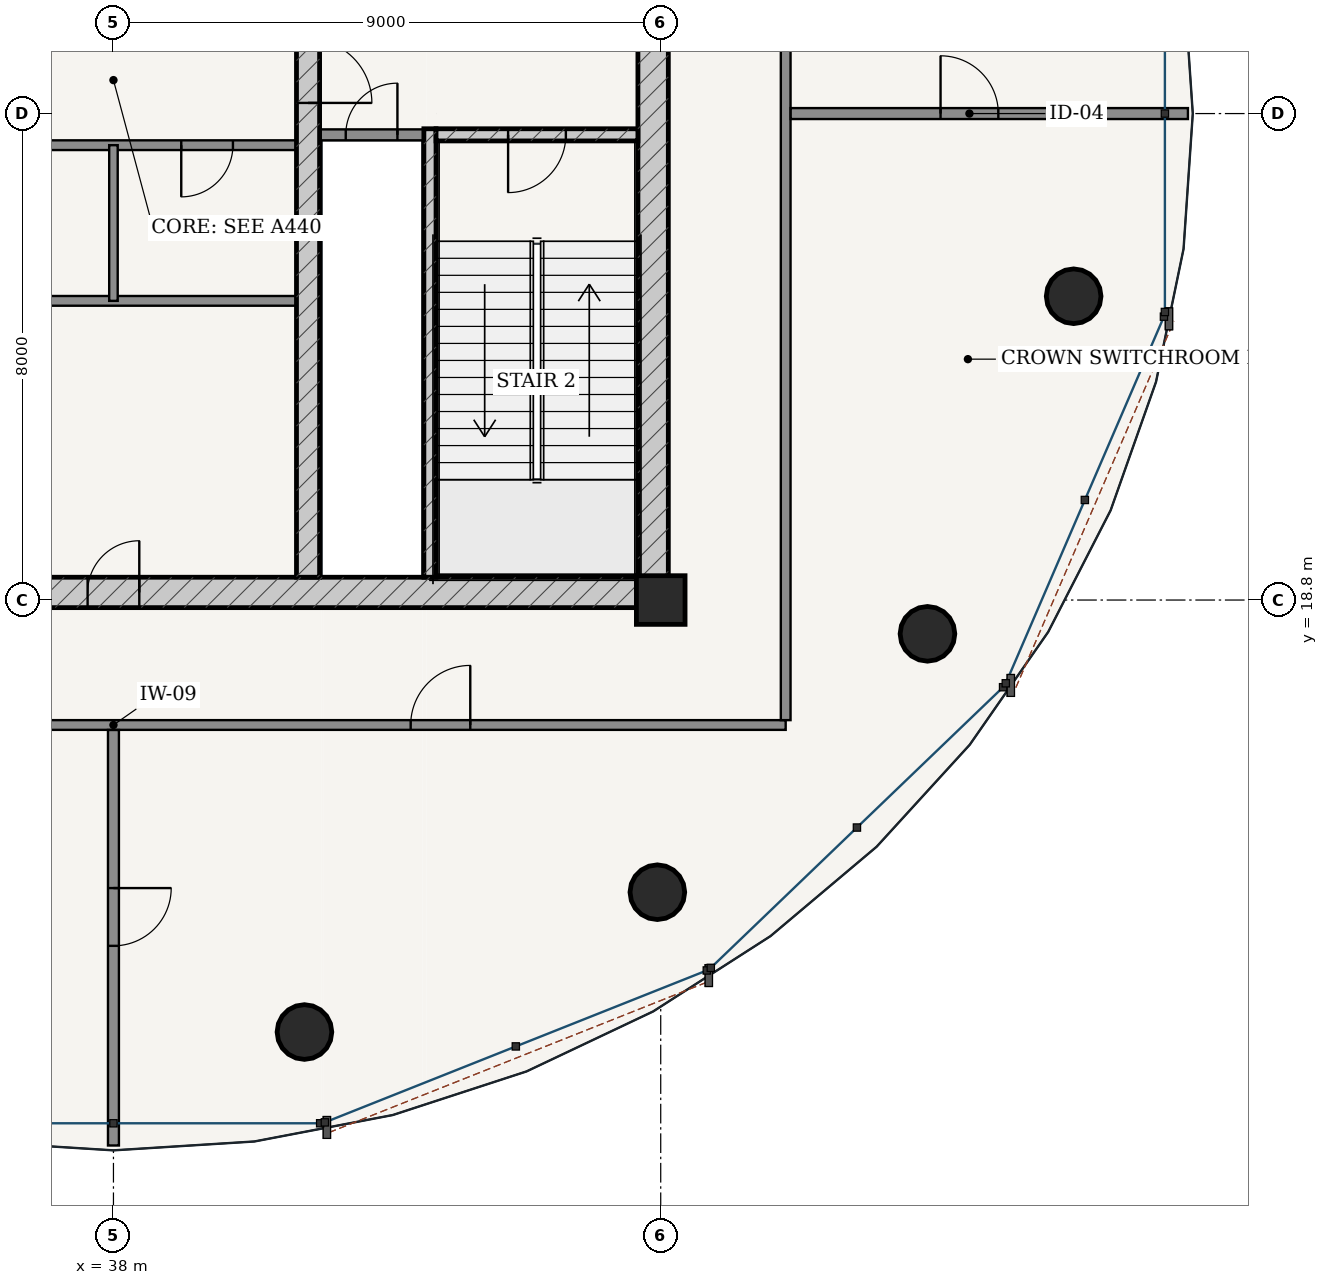
"""IFC4 building model, lengths in metres.
Left out: names, types, materials, properties, quantities, classifications, styles, units other than length and angle.
Written with IfcOpenShell. Run it as: python <this file> out.ifc"""

import sys

from ifc_helpers import new_model, si_unit, direction, frame, frame_2d, origin, origin_2d, place, context, subcontext, project, spatial, rectangle, hollow_circle, extrude, source, transform, mapped, element, fill, save


model = new_model("IFC4")
c1 = context("Model", 3, precision=1e-05, world=origin(), true_north=direction((-0.2419218956, 0.970295726276)))
c2 = subcontext(c1, "Body", "Model", "MODEL_VIEW")
j1 = project(units=[si_unit("LENGTHUNIT", "METRE"), si_unit("PLANEANGLEUNIT", "RADIAN")], contexts=[c1])
p1 = place(None, origin())
s1 = spatial("IfcSite", under=j1, at=p1, CompositionType="ELEMENT")
p2 = place(p1, origin())
s2 = spatial("IfcBuilding", under=s1, at=p2, CompositionType="ELEMENT")
p3 = place(p2, frame((0.0, 0.0, 316.5)))
s3 = spatial("IfcBuildingStorey", under=s2, at=p3, CompositionType="ELEMENT", Elevation=316.5)
p4 = place(p3, frame((47.0, 18.8, 0.0), z_axis=(0.0, 0.0, 1.0), x_axis=(1.0, 0.0, 0.0)))
e1 = element("IfcColumn", 1, at=p4, inside=s3, PredefinedType="COLUMN", context=c2, shape_type="SweptSolid", body=[
    extrude(rectangle(XDim=0.8, YDim=0.8, at=origin_2d()), origin(), (0.0, 0.0, 1.0), 5.2),
])
p5 = place(p3, frame((28.875, 18.925, 0.0), z_axis=(0.0, 0.0, 1.0), x_axis=(1.0, 0.0, 0.0)))
e2 = element("IfcWall", 2, at=p5, inside=s3, PredefinedType="SHEAR", context=c2, shape_type="SweptSolid", body=[
    extrude(rectangle(XDim=18.25, YDim=0.5, at=frame_2d((9.125, 0.0))), origin(), (0.0, 0.0, 1.0), 4.78),
])
p6 = place(p5, frame((8.7, 0.0, 0.0)))
e3 = element("IfcOpeningElement", 3, at=p6, cuts=e2, PredefinedType="OPENING", context=c2, shape_type="SweptSolid", body=[
    extrude(rectangle(XDim=0.85, YDim=2.1, at=frame_2d((0.425, 1.05))), frame((0.0, 0.26, 0.0), z_axis=(0.0, -1.0, 0.0), x_axis=(1.0, 0.0, 0.0)), (0.0, 0.0, 1.0), 0.52),
])
p7 = place(p3, frame((46.875, 19.175, 0.0), z_axis=(0.0, 0.0, 1.0), x_axis=(0.0, 1.0, 0.0)))
e4 = element("IfcWall", 4, at=p7, inside=s3, PredefinedType="SHEAR", context=c2, shape_type="SweptSolid", body=[
    extrude(rectangle(XDim=15.25, YDim=0.5, at=frame_2d((7.625, 0.0))), origin(), (0.0, 0.0, 1.0), 4.78),
])
p8 = place(p7, frame((9.875, 0.0, 0.0)))
e5 = element("IfcOpeningElement", 5, at=p8, cuts=e4, PredefinedType="OPENING", context=c2, shape_type="SweptSolid", body=[
    extrude(rectangle(XDim=1.5, YDim=2.2, at=frame_2d((0.75, 1.1))), frame((0.0, 0.26, 0.0), z_axis=(0.0, -1.0, 0.0), x_axis=(1.0, 0.0, 0.0)), (0.0, 0.0, 1.0), 0.52),
])
p9 = place(p3, frame((43.205, 19.175, 0.0), z_axis=(0.0, 0.0, 1.0), x_axis=(0.0, 1.0, 0.0)))
e6 = element("IfcWall", 6, at=p9, inside=s3, PredefinedType="SOLIDWALL", context=c2, shape_type="SweptSolid", body=[
    extrude(rectangle(XDim=7.375, YDim=0.2, at=frame_2d((3.688, 0.0))), origin(), (0.0, 0.0, 1.0), 4.78),
])
p10 = place(p3, frame((43.305, 26.45, 0.0), z_axis=(0.0, 0.0, 1.0), x_axis=(1.0, 0.0, 0.0)))
e7 = element("IfcWall", 7, at=p10, inside=s3, PredefinedType="SOLIDWALL", context=c2, shape_type="SweptSolid", body=[
    extrude(rectangle(XDim=3.32, YDim=0.2, at=frame_2d((1.66, 0.0))), origin(), (0.0, 0.0, 1.0), 4.78),
])
p11 = place(p10, frame((1.185, 0.0, 0.0)))
e8 = element("IfcOpeningElement", 8, at=p11, cuts=e7, PredefinedType="OPENING", context=c2, shape_type="SweptSolid", body=[
    extrude(rectangle(XDim=0.95, YDim=2.15, at=frame_2d((0.475, 1.075))), frame((0.0, 0.11, 0.0), z_axis=(0.0, -1.0, 0.0), x_axis=(1.0, 0.0, 0.0)), (0.0, 0.0, 1.0), 0.22),
])
p12 = place(p3, frame((41.2, 19.175, 0.0), z_axis=(0.0, 0.0, 1.0), x_axis=(0.0, 1.0, 0.0)))
e9 = element("IfcWall", 9, at=p12, inside=s3, PredefinedType="SHEAR", context=c2, shape_type="SweptSolid", body=[
    extrude(rectangle(XDim=15.25, YDim=0.38, at=frame_2d((7.625, 0.0))), origin(), (0.0, 0.0, 1.0), 4.78),
])
p13 = place(p12, frame((7.8, 0.0, 0.0)))
e10 = element("IfcOpeningElement", 10, at=p13, cuts=e9, PredefinedType="OPENING", context=c2, shape_type="SweptSolid", body=[
    extrude(rectangle(XDim=1.05, YDim=2.15, at=frame_2d((0.525, 1.075))), frame((0.0, 0.2, 0.0), z_axis=(0.0, -1.0, 0.0), x_axis=(1.0, 0.0, 0.0)), (0.0, 0.0, 1.0), 0.4),
])
for number, where, z_axis, x_axis in (
    (11, (41.141, 11.696, 0.0), (0.0, 0.0, 1.0), (1.0, 0.0, 0.0)),
    (12, (46.945, 13.995, 0.0), (0.0, 0.0, 1.0), (1.0, 0.0, 0.0)),
    (13, (51.387, 18.244, 0.0), (0.0, 0.0, 1.0), (1.0, 0.0, 0.0)),
    (14, (53.791, 23.796, 0.0), (0.0, 0.0, 1.0), (1.0, 0.0, 0.0)),
):
    element("IfcColumn", number, at=place(p3, frame(where, z_axis=z_axis, x_axis=x_axis)), inside=s3, PredefinedType="COLUMN", context=c2, shape_type="SweptSolid", body=[
        extrude(hollow_circle(Radius=0.45, WallThickness=0.032, at=origin_2d()), origin(), (0.0, 0.0, 1.0), 5.2),
    ])
p14 = place(p3, frame((41.39, 26.45, 0.0), z_axis=(0.0, 0.0, 1.0), x_axis=(1.0, 0.0, 0.0)))
e15 = element("IfcWall", 15, at=p14, inside=s3, PredefinedType="PARTITIONING", context=c2, shape_type="SweptSolid", body=[
    extrude(rectangle(XDim=1.71, YDim=0.18, at=frame_2d((0.855, 0.0))), origin(), (0.0, 0.0, 1.0), 4.78),
])
p15 = place(p14, frame((0.43, 0.0, 0.0)))
e16 = element("IfcOpeningElement", 16, at=p15, cuts=e15, PredefinedType="OPENING", context=c2, shape_type="SweptSolid", body=[
    extrude(rectangle(XDim=0.85, YDim=2.1, at=frame_2d((0.425, 1.05))), frame((0.0, 0.1, 0.0), z_axis=(0.0, -1.0, 0.0), x_axis=(1.0, 0.0, 0.0)), (0.0, 0.0, 1.0), 0.2),
])
p16 = place(p3, frame((34.99, 26.28, 0.0), z_axis=(0.0, 0.0, 1.0), x_axis=(1.0, 0.0, 0.0)))
e17 = element("IfcWall", 17, at=p16, inside=s3, PredefinedType="PARTITIONING", context=c2, shape_type="SweptSolid", body=[
    extrude(rectangle(XDim=6.02, YDim=0.16, at=frame_2d((3.01, 0.0))), origin(), (0.0, 0.0, 1.0), 4.78),
])
p17 = place(p16, frame((1.045, 0.0, 0.0)))
e18 = element("IfcOpeningElement", 18, at=p17, cuts=e17, PredefinedType="OPENING", context=c2, shape_type="SweptSolid", body=[
    extrude(rectangle(XDim=0.85, YDim=2.1, at=frame_2d((0.425, 1.05))), frame((0.0, 0.09, 0.0), z_axis=(0.0, -1.0, 0.0), x_axis=(1.0, 0.0, 0.0)), (0.0, 0.0, 1.0), 0.18),
])
p18 = place(p16, frame((4.125, 0.0, 0.0)))
e19 = element("IfcOpeningElement", 19, at=p18, cuts=e17, PredefinedType="OPENING", context=c2, shape_type="SweptSolid", body=[
    extrude(rectangle(XDim=0.85, YDim=2.1, at=frame_2d((0.425, 1.05))), frame((0.0, 0.09, 0.0), z_axis=(0.0, -1.0, 0.0), x_axis=(1.0, 0.0, 0.0)), (0.0, 0.0, 1.0), 0.18),
])
p19 = place(p3, frame((34.99, 23.72, 0.0), z_axis=(0.0, 0.0, 1.0), x_axis=(1.0, 0.0, 0.0)))
e20 = element("IfcWall", 20, at=p19, inside=s3, PredefinedType="PARTITIONING", context=c2, shape_type="SweptSolid", body=[
    extrude(rectangle(XDim=6.02, YDim=0.16, at=frame_2d((3.01, 0.0))), origin(), (0.0, 0.0, 1.0), 4.78),
])
p20 = place(p3, frame((38.0, 23.72, 0.0), z_axis=(0.0, 0.0, 1.0), x_axis=(0.0, 1.0, 0.0)))
e21 = element("IfcWall", 21, at=p20, inside=s3, PredefinedType="PARTITIONING", context=c2, shape_type="SweptSolid", body=[
    extrude(rectangle(XDim=2.56, YDim=0.14, at=frame_2d((1.28, 0.0))), origin(), (0.0, 0.0, 1.0), 4.78),
])
p21 = place(p3, frame((26.945, 16.745, 0.0), z_axis=(0.0, 0.0, 1.0), x_axis=(1.0, 0.0, 0.0)))
e22 = element("IfcWall", 22, at=p21, inside=s3, PredefinedType="PARTITIONING", context=c2, shape_type="SweptSolid", body=[
    extrude(rectangle(XDim=22.11, YDim=0.16, at=frame_2d((11.055, 0.0))), origin(), (0.0, 0.0, 1.0), 4.352),
])
p22 = place(p21, frame((5.187, 0.0, 0.0)))
e23 = element("IfcOpeningElement", 23, at=p22, cuts=e22, PredefinedType="OPENING", context=c2, shape_type="SweptSolid", body=[
    extrude(rectangle(XDim=0.98, YDim=2.2, at=frame_2d((0.49, 1.1))), frame((0.0, 0.09, 0.0), z_axis=(0.0, -1.0, 0.0), x_axis=(1.0, 0.0, 0.0)), (0.0, 0.0, 1.0), 0.18),
])
p23 = place(p21, frame((15.943, 0.0, 0.0)))
e24 = element("IfcOpeningElement", 24, at=p23, cuts=e22, PredefinedType="OPENING", context=c2, shape_type="SweptSolid", body=[
    extrude(rectangle(XDim=0.98, YDim=2.2, at=frame_2d((0.49, 1.1))), frame((0.0, 0.09, 0.0), z_axis=(0.0, -1.0, 0.0), x_axis=(1.0, 0.0, 0.0)), (0.0, 0.0, 1.0), 0.18),
])
p24 = place(p3, frame((49.055, 16.825, 0.0), z_axis=(0.0, 0.0, 1.0), x_axis=(0.0, 1.0, 0.0)))
e25 = element("IfcWall", 25, at=p24, inside=s3, PredefinedType="PARTITIONING", context=c2, shape_type="SweptSolid", body=[
    extrude(rectangle(XDim=19.95, YDim=0.16, at=frame_2d((9.975, 0.0))), origin(), (0.0, 0.0, 1.0), 4.352),
])
p25 = place(p3, frame((49.137, 26.8, 0.0), z_axis=(0.0, 0.0, 1.0), x_axis=(1.0, 0.0, 0.0)))
e26 = element("IfcWall", 26, at=p25, inside=s3, PredefinedType="PARTITIONING", context=c2, shape_type="SweptSolid", body=[
    extrude(rectangle(XDim=6.533, YDim=0.18, at=frame_2d((3.267, 0.0))), origin(), (0.0, 0.0, 1.0), 4.411),
])
p26 = place(p25, frame((2.465, 0.0, 0.0)))
e27 = element("IfcOpeningElement", 27, at=p26, cuts=e26, PredefinedType="OPENING", context=c2, shape_type="SweptSolid", body=[
    extrude(rectangle(XDim=0.95, YDim=2.15, at=frame_2d((0.475, 1.075))), frame((0.0, 0.1, 0.0), z_axis=(0.0, -1.0, 0.0), x_axis=(1.0, 0.0, 0.0)), (0.0, 0.0, 1.0), 0.2),
])
p27 = place(p3, frame((38.0, 16.663, 0.0), z_axis=(0.0, 0.0, 1.0), x_axis=(0.0, -1.0, 0.0)))
e28 = element("IfcWall", 28, at=p27, inside=s3, PredefinedType="PARTITIONING", context=c2, shape_type="SweptSolid", body=[
    extrude(rectangle(XDim=6.833, YDim=0.18, at=frame_2d((3.417, 0.0))), origin(), (0.0, 0.0, 1.0), 4.411),
])
p28 = place(p27, frame((2.6, 0.0, 0.0)))
e29 = element("IfcOpeningElement", 29, at=p28, cuts=e28, PredefinedType="OPENING", context=c2, shape_type="SweptSolid", body=[
    extrude(rectangle(XDim=0.95, YDim=2.15, at=frame_2d((0.475, 1.075))), frame((0.0, 0.1, 0.0), z_axis=(0.0, -1.0, 0.0), x_axis=(1.0, 0.0, 0.0)), (0.0, 0.0, 1.0), 0.2),
])
m1 = source(origin(), c2, "Body", "SweptSolid", [
    extrude(rectangle(XDim=1.05, YDim=2.15, at=frame_2d((0.525, 1.075))), frame((0.0, 0.025, 0.0), z_axis=(0.0, -1.0, 0.0), x_axis=(1.0, 0.0, 0.0)), (0.0, 0.0, 1.0), 0.05),
])
p29 = place(p13, frame((1.05, 0.0, 0.0), z_axis=(0.0, 0.0, 1.0), x_axis=(-1.0, 0.0, 0.0)))
e30 = element("IfcDoor", 30, at=p29, inside=s3, OperationType="SINGLE_SWING_RIGHT", PredefinedType="DOOR", context=c2, shape_type="MappedRepresentation", body=[
    mapped(m1, transform((0.0, 0.0, 0.0), scale=1.0)),
])
fill(e10, e30)
m2 = source(origin(), c2, "Body", "SweptSolid", [
    extrude(rectangle(XDim=0.95, YDim=2.15, at=frame_2d((0.475, 1.075))), frame((0.0, 0.025, 0.0), z_axis=(0.0, -1.0, 0.0), x_axis=(1.0, 0.0, 0.0)), (0.0, 0.0, 1.0), 0.05),
])
p30 = place(p11, frame((0.95, 0.0, 0.0), z_axis=(0.0, 0.0, 1.0), x_axis=(-1.0, 0.0, 0.0)))
e31 = element("IfcDoor", 31, at=p30, inside=s3, OperationType="SINGLE_SWING_RIGHT", PredefinedType="DOOR", context=c2, shape_type="MappedRepresentation", body=[
    mapped(m2, transform((0.0, 0.0, 0.0), scale=1.0)),
])
fill(e8, e31)
m3 = source(origin(), c2, "Body", "SweptSolid", [
    extrude(rectangle(XDim=0.85, YDim=2.1, at=frame_2d((0.425, 1.05))), frame((0.0, 0.025, 0.0), z_axis=(0.0, -1.0, 0.0), x_axis=(1.0, 0.0, 0.0)), (0.0, 0.0, 1.0), 0.05),
])
p31 = place(p15, origin())
e32 = element("IfcDoor", 32, at=p31, inside=s3, OperationType="SINGLE_SWING_RIGHT", PredefinedType="DOOR", context=c2, shape_type="MappedRepresentation", body=[
    mapped(m3, transform((0.0, 0.0, 0.0), scale=1.0)),
])
fill(e16, e32)
p32 = place(p18, frame((0.85, 0.0, 0.0), z_axis=(0.0, 0.0, 1.0), x_axis=(-1.0, 0.0, 0.0)))
e33 = element("IfcDoor", 33, at=p32, inside=s3, OperationType="SINGLE_SWING_RIGHT", PredefinedType="DOOR", context=c2, shape_type="MappedRepresentation", body=[
    mapped(m3, transform((0.0, 0.0, 0.0), scale=1.0)),
])
fill(e19, e33)
p33 = place(p6, origin())
e34 = element("IfcDoor", 34, at=p33, inside=s3, OperationType="SINGLE_SWING_RIGHT", PredefinedType="DOOR", context=c2, shape_type="MappedRepresentation", body=[
    mapped(m3, transform((0.0, 0.0, 0.0), scale=1.0)),
])
fill(e3, e34)
m4 = source(origin(), c2, "Body", "SweptSolid", [
    extrude(rectangle(XDim=0.98, YDim=2.2, at=frame_2d((0.49, 1.1))), frame((0.0, 0.025, 0.0), z_axis=(0.0, -1.0, 0.0), x_axis=(1.0, 0.0, 0.0)), (0.0, 0.0, 1.0), 0.05),
])
p34 = place(p23, origin())
e35 = element("IfcDoor", 35, at=p34, inside=s3, OperationType="SINGLE_SWING_RIGHT", PredefinedType="DOOR", context=c2, shape_type="MappedRepresentation", body=[
    mapped(m4, transform((0.0, 0.0, 0.0), scale=1.0)),
])
fill(e24, e35)
p35 = place(p26, origin())
e36 = element("IfcDoor", 36, at=p35, inside=s3, OperationType="SINGLE_SWING_LEFT", PredefinedType="DOOR", context=c2, shape_type="MappedRepresentation", body=[
    mapped(m2, transform((0.0, 0.0, 0.0), scale=1.0)),
])
fill(e27, e36)
p36 = place(p28, origin())
e37 = element("IfcDoor", 37, at=p36, inside=s3, OperationType="SINGLE_SWING_LEFT", PredefinedType="DOOR", context=c2, shape_type="MappedRepresentation", body=[
    mapped(m2, transform((0.0, 0.0, 0.0), scale=1.0)),
])
fill(e29, e37)
save(model, sys.argv[1])
